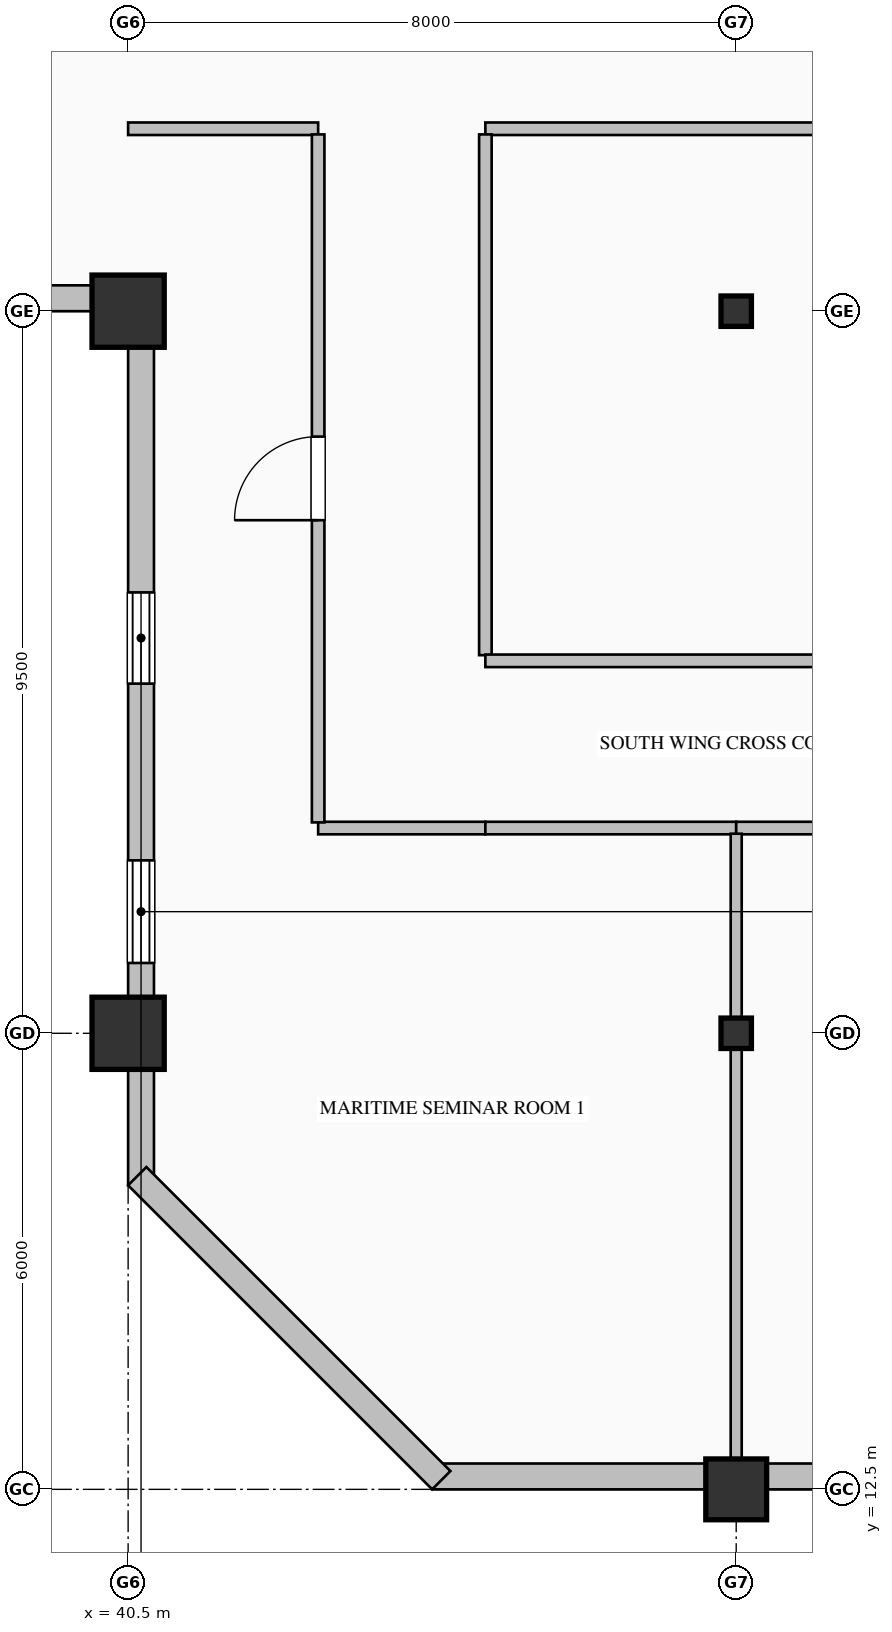
"""IFC4 building model, lengths in metres.
Left out: names, types, materials, properties, quantities, classifications, styles, units other than length and angle.
Written with IfcOpenShell. Run it as: python <this file> out.ifc"""

import sys

from ifc_helpers import new_model, si_unit, direction, frame, frame_2d, origin, origin_2d, place, context, subcontext, project, spatial, rectangle, hollow_rectangle, i_section, extrude, element, fill, save


model = new_model("IFC4")
c1 = context("Model", 3, precision=1e-05, world=origin(), true_north=direction((0.0, 1.0)))
c2 = subcontext(c1, "Body", "Model", "MODEL_VIEW")
j1 = project(units=[si_unit("LENGTHUNIT", "METRE"), si_unit("PLANEANGLEUNIT", "RADIAN")], contexts=[c1])
p1 = place(None, origin())
s1 = spatial("IfcSite", under=j1, at=p1, CompositionType="ELEMENT")
p2 = place(p1, origin())
s2 = spatial("IfcBuilding", under=s1, at=p2, CompositionType="ELEMENT")
p3 = place(p2, frame((0.0, 0.0, 217.8)))
s3 = spatial("IfcBuildingStorey", under=s2, at=p3, CompositionType="ELEMENT", Elevation=217.8)
for number, where, z_axis, x_axis in (
    (1, (40.5, 18.5, 0.0), (0.0, 0.0, 1.0), (1.0, 0.0, 0.0)),
    (2, (40.5, 28.0, 0.0), (0.0, 0.0, 1.0), (1.0, 0.0, 0.0)),
):
    element("IfcColumn", number, at=place(p3, frame(where, z_axis=z_axis, x_axis=x_axis)), inside=s3, PredefinedType="COLUMN", context=c2, shape_type="SweptSolid", body=[
        extrude(hollow_rectangle(XDim=0.95, YDim=0.95, WallThickness=0.036, at=origin_2d()), origin(), (0.0, 0.0, 1.0), 4.0),
    ])
p4 = place(p3, frame((48.5, 12.5, 0.0), z_axis=(0.0, 0.0, 1.0), x_axis=(1.0, 0.0, 0.0)))
e3 = element("IfcColumn", 3, at=p4, inside=s3, PredefinedType="COLUMN", context=c2, shape_type="SweptSolid", body=[
    extrude(hollow_rectangle(XDim=0.8, YDim=0.8, WallThickness=0.032, at=origin_2d()), origin(), (0.0, 0.0, 1.0), 4.0),
])
for number, where, z_axis, x_axis in (
    (4, (48.5, 18.5, 0.0), (0.0, 0.0, 1.0), (1.0, 0.0, 0.0)),
    (5, (48.5, 28.0, 0.0), (0.0, 0.0, 1.0), (1.0, 0.0, 0.0)),
):
    element("IfcColumn", number, at=place(p3, frame(where, z_axis=z_axis, x_axis=x_axis)), inside=s3, PredefinedType="COLUMN", context=c2, shape_type="SweptSolid", body=[
        extrude(i_section(OverallWidth=0.4, OverallDepth=0.4, WebThickness=0.013, FlangeThickness=0.021, FilletRadius=0.022, at=origin_2d()), origin(), (0.0, 0.0, 1.0), 4.0),
    ])
p5 = place(p3, frame((40.67, 16.5, 0.0), z_axis=(0.0, 0.0, 1.0), x_axis=(0.0, 1.0, 0.0)))
e6 = element("IfcWall", 6, at=p5, inside=s3, PredefinedType="SOLIDWALL", context=c2, shape_type="SweptSolid", body=[
    extrude(rectangle(XDim=11.84, YDim=0.34, at=frame_2d((5.92, 0.0))), origin(), (0.0, 0.0, 1.0), 3.187),
])
p6 = place(p5, frame((2.925, 0.0, 0.9)))
e7 = element("IfcOpeningElement", 7, at=p6, cuts=e6, PredefinedType="OPENING", context=c2, shape_type="SweptSolid", body=[
    extrude(rectangle(XDim=1.35, YDim=1.85, at=frame_2d((0.675, 0.925))), frame((0.0, 0.18, 0.0), z_axis=(0.0, -1.0, 0.0), x_axis=(1.0, 0.0, 0.0)), (0.0, 0.0, 1.0), 0.36),
])
p7 = place(p5, frame((6.6, 0.0, 0.7)))
e8 = element("IfcOpeningElement", 8, at=p7, cuts=e6, PredefinedType="OPENING", context=c2, shape_type="SweptSolid", body=[
    extrude(rectangle(XDim=1.2, YDim=1.85, at=frame_2d((0.6, 0.925))), frame((0.0, 0.18, 0.0), z_axis=(0.0, -1.0, 0.0), x_axis=(1.0, 0.0, 0.0)), (0.0, 0.0, 1.0), 0.36),
])
p8 = place(p3, frame((40.52, 28.17, 0.0), z_axis=(0.0, 0.0, 1.0), x_axis=(-1.0, 0.0, 0.0)))
e9 = element("IfcWall", 9, at=p8, inside=s3, PredefinedType="SOLIDWALL", context=c2, shape_type="SweptSolid", body=[
    extrude(rectangle(XDim=27.52, YDim=0.34, at=frame_2d((13.76, 0.0))), origin(), (0.0, 0.0, 1.0), 3.187),
])
p9 = place(p8, frame((10.125, 0.0, 0.9)))
e10 = element("IfcOpeningElement", 10, at=p9, cuts=e9, PredefinedType="OPENING", context=c2, shape_type="SweptSolid", body=[
    extrude(rectangle(XDim=1.35, YDim=1.85, at=frame_2d((0.675, 0.925))), frame((0.0, 0.18, 0.0), z_axis=(0.0, -1.0, 0.0), x_axis=(1.0, 0.0, 0.0)), (0.0, 0.0, 1.0), 0.36),
])
p10 = place(p8, frame((13.8, 0.0, 0.7)))
e11 = element("IfcOpeningElement", 11, at=p10, cuts=e9, PredefinedType="OPENING", context=c2, shape_type="SweptSolid", body=[
    extrude(rectangle(XDim=1.2, YDim=1.85, at=frame_2d((0.6, 0.925))), frame((0.0, 0.18, 0.0), z_axis=(0.0, -1.0, 0.0), x_axis=(1.0, 0.0, 0.0)), (0.0, 0.0, 1.0), 0.36),
])
p11 = place(p8, frame((17.4, 0.0, 0.9)))
e12 = element("IfcOpeningElement", 12, at=p11, cuts=e9, PredefinedType="OPENING", context=c2, shape_type="SweptSolid", body=[
    extrude(rectangle(XDim=1.2, YDim=1.85, at=frame_2d((0.6, 0.925))), frame((0.0, 0.18, 0.0), z_axis=(0.0, -1.0, 0.0), x_axis=(1.0, 0.0, 0.0)), (0.0, 0.0, 1.0), 0.36),
])
p12 = place(p8, frame((20.925, 0.0, 0.9)))
e13 = element("IfcOpeningElement", 13, at=p12, cuts=e9, PredefinedType="OPENING", context=c2, shape_type="SweptSolid", body=[
    extrude(rectangle(XDim=1.35, YDim=1.85, at=frame_2d((0.675, 0.925))), frame((0.0, 0.18, 0.0), z_axis=(0.0, -1.0, 0.0), x_axis=(1.0, 0.0, 0.0)), (0.0, 0.0, 1.0), 0.36),
])
p13 = place(p3, frame((60.0, 12.67, 0.0), z_axis=(0.0, 0.0, 1.0), x_axis=(-1.0, 0.0, 0.0)))
e14 = element("IfcWall", 14, at=p13, inside=s3, PredefinedType="SOLIDWALL", context=c2, shape_type="SweptSolid", body=[
    extrude(rectangle(XDim=15.5, YDim=0.34, at=frame_2d((7.75, 0.0))), origin(), (0.0, 0.0, 1.0), 3.325),
])
p14 = place(p13, frame((6.525, 0.0, 0.9)))
e15 = element("IfcOpeningElement", 15, at=p14, cuts=e14, PredefinedType="OPENING", context=c2, shape_type="SweptSolid", body=[
    extrude(rectangle(XDim=1.35, YDim=1.85, at=frame_2d((0.675, 0.925))), frame((0.0, 0.18, 0.0), z_axis=(0.0, -1.0, 0.0), x_axis=(1.0, 0.0, 0.0)), (0.0, 0.0, 1.0), 0.36),
])
p15 = place(p3, frame((44.62, 12.62, 0.0), z_axis=(0.0, 0.0, 1.0), x_axis=(-0.707106781187, 0.707106781187, 0.0)))
e16 = element("IfcWall", 16, at=p15, inside=s3, PredefinedType="SOLIDWALL", context=c2, shape_type="SweptSolid", body=[
    extrude(rectangle(XDim=5.657, YDim=0.34, at=frame_2d((2.828, 0.0))), origin(), (0.0, 0.0, 1.0), 3.775),
])
p16 = place(p3, frame((56.5, 30.4, 0.0), z_axis=(0.0, 0.0, 1.0), x_axis=(-1.0, 0.0, 0.0)))
e17 = element("IfcWall", 17, at=p16, inside=s3, PredefinedType="PARTITIONING", context=c2, shape_type="SweptSolid", body=[
    extrude(rectangle(XDim=11.3, YDim=0.165, at=frame_2d((5.65, 0.0))), origin(), (0.0, 0.0, 1.0), 3.775),
])
p17 = place(p3, frame((43.0, 30.4, 0.0), z_axis=(0.0, 0.0, 1.0), x_axis=(-1.0, 0.0, 0.0)))
e18 = element("IfcWall", 18, at=p17, inside=s3, PredefinedType="PARTITIONING", context=c2, shape_type="SweptSolid", body=[
    extrude(rectangle(XDim=2.5, YDim=0.165, at=frame_2d((1.25, 0.0))), origin(), (0.0, 0.0, 1.0), 3.775),
])
p18 = place(p3, frame((45.2, 30.325, 0.0), z_axis=(0.0, 0.0, 1.0), x_axis=(0.0, -1.0, 0.0)))
e19 = element("IfcWall", 19, at=p18, inside=s3, PredefinedType="PARTITIONING", context=c2, shape_type="SweptSolid", body=[
    extrude(rectangle(XDim=6.851, YDim=0.165, at=frame_2d((3.425, 0.0))), origin(), (0.0, 0.0, 1.0), 3.775),
])
p19 = place(p3, frame((45.2, 21.2, 0.0), z_axis=(0.0, 0.0, 1.0), x_axis=(-1.0, 0.0, 0.0)))
e20 = element("IfcWall", 20, at=p19, inside=s3, PredefinedType="PARTITIONING", context=c2, shape_type="SweptSolid", body=[
    extrude(rectangle(XDim=2.2, YDim=0.165, at=frame_2d((1.1, 0.0))), origin(), (0.0, 0.0, 1.0), 3.775),
])
p20 = place(p3, frame((43.0, 21.274, 0.0), z_axis=(0.0, 0.0, 1.0), x_axis=(0.0, 1.0, 0.0)))
e21 = element("IfcWall", 21, at=p20, inside=s3, PredefinedType="PARTITIONING", context=c2, shape_type="SweptSolid", body=[
    extrude(rectangle(XDim=9.051, YDim=0.165, at=frame_2d((4.525, 0.0))), origin(), (0.0, 0.0, 1.0), 3.775),
])
p21 = place(p20, frame((3.976, 0.0, 0.0)))
e22 = element("IfcOpeningElement", 22, at=p21, cuts=e21, PredefinedType="OPENING", context=c2, shape_type="SweptSolid", body=[
    extrude(rectangle(XDim=1.1, YDim=2.2, at=frame_2d((0.55, 1.1))), frame((0.0, 0.093, 0.0), z_axis=(0.0, -1.0, 0.0), x_axis=(1.0, 0.0, 0.0)), (0.0, 0.0, 1.0), 0.185),
])
p22 = place(p3, frame((45.2, 23.4, 0.0), z_axis=(0.0, 0.0, 1.0), x_axis=(1.0, 0.0, 0.0)))
e23 = element("IfcWall", 23, at=p22, inside=s3, PredefinedType="PARTITIONING", context=c2, shape_type="SweptSolid", body=[
    extrude(rectangle(XDim=12.8, YDim=0.165, at=frame_2d((6.4, 0.0))), origin(), (0.0, 0.0, 1.0), 3.467),
])
p23 = place(p22, frame((5.9, 0.0, 0.0)))
e24 = element("IfcOpeningElement", 24, at=p23, cuts=e23, PredefinedType="OPENING", context=c2, shape_type="SweptSolid", body=[
    extrude(rectangle(XDim=1.0, YDim=2.15, at=frame_2d((0.5, 1.075))), frame((0.0, 0.093, 0.0), z_axis=(0.0, -1.0, 0.0), x_axis=(1.0, 0.0, 0.0)), (0.0, 0.0, 1.0), 0.185),
])
p24 = place(p3, frame((48.5, 21.2, 0.0), z_axis=(0.0, 0.0, 1.0), x_axis=(-1.0, 0.0, 0.0)))
e25 = element("IfcWall", 25, at=p24, inside=s3, PredefinedType="PARTITIONING", context=c2, shape_type="SweptSolid", body=[
    extrude(rectangle(XDim=3.3, YDim=0.165, at=frame_2d((1.65, 0.0))), origin(), (0.0, 0.0, 1.0), 3.775),
])
p25 = place(p3, frame((56.5, 21.2, 0.0), z_axis=(0.0, 0.0, 1.0), x_axis=(-1.0, 0.0, 0.0)))
e26 = element("IfcWall", 26, at=p25, inside=s3, PredefinedType="PARTITIONING", context=c2, shape_type="SweptSolid", body=[
    extrude(rectangle(XDim=8.0, YDim=0.165, at=frame_2d((4.0, 0.0))), origin(), (0.0, 0.0, 1.0), 3.775),
])
p26 = place(p25, frame((3.45, 0.0, 0.0)))
e27 = element("IfcOpeningElement", 27, at=p26, cuts=e26, PredefinedType="OPENING", context=c2, shape_type="SweptSolid", body=[
    extrude(rectangle(XDim=1.1, YDim=2.2, at=frame_2d((0.55, 1.1))), frame((0.0, 0.093, 0.0), z_axis=(0.0, -1.0, 0.0), x_axis=(1.0, 0.0, 0.0)), (0.0, 0.0, 1.0), 0.185),
])
p27 = place(p3, frame((48.5, 21.125, 0.0), z_axis=(0.0, 0.0, 1.0), x_axis=(0.0, -1.0, 0.0)))
e28 = element("IfcWall", 28, at=p27, inside=s3, PredefinedType="PARTITIONING", context=c2, shape_type="SweptSolid", body=[
    extrude(rectangle(XDim=8.293, YDim=0.145, at=frame_2d((4.147, 0.0))), origin(), (0.0, 0.0, 1.0), 2.967),
])
p28 = place(p6, origin())
e29 = element("IfcWindow", 29, at=p28, inside=s3, PartitioningType="DOUBLE_PANEL_VERTICAL", PredefinedType="WINDOW", context=c2, shape_type="SweptSolid", body=[
    extrude(rectangle(XDim=1.35, YDim=1.85, at=frame_2d((0.675, 0.925))), frame((0.0, 0.15, 0.0), z_axis=(0.0, -1.0, 0.0), x_axis=(1.0, 0.0, 0.0)), (0.0, 0.0, 1.0), 0.06),
])
fill(e7, e29)
p29 = place(p7, origin())
e30 = element("IfcWindow", 30, at=p29, inside=s3, PartitioningType="DOUBLE_PANEL_VERTICAL", PredefinedType="WINDOW", context=c2, shape_type="SweptSolid", body=[
    extrude(rectangle(XDim=1.2, YDim=1.85, at=frame_2d((0.6, 0.925))), frame((0.0, 0.15, 0.0), z_axis=(0.0, -1.0, 0.0), x_axis=(1.0, 0.0, 0.0)), (0.0, 0.0, 1.0), 0.06),
])
fill(e8, e30)
p30 = place(p21, origin())
e31 = element("IfcDoor", 31, at=p30, inside=s3, OperationType="SINGLE_SWING_LEFT", PredefinedType="DOOR", context=c2, shape_type="SweptSolid", body=[
    extrude(rectangle(XDim=1.1, YDim=2.2, at=frame_2d((0.55, 1.1))), frame((0.0, 0.025, 0.0), z_axis=(0.0, -1.0, 0.0), x_axis=(1.0, 0.0, 0.0)), (0.0, 0.0, 1.0), 0.05),
])
fill(e22, e31)
save(model, sys.argv[1])
